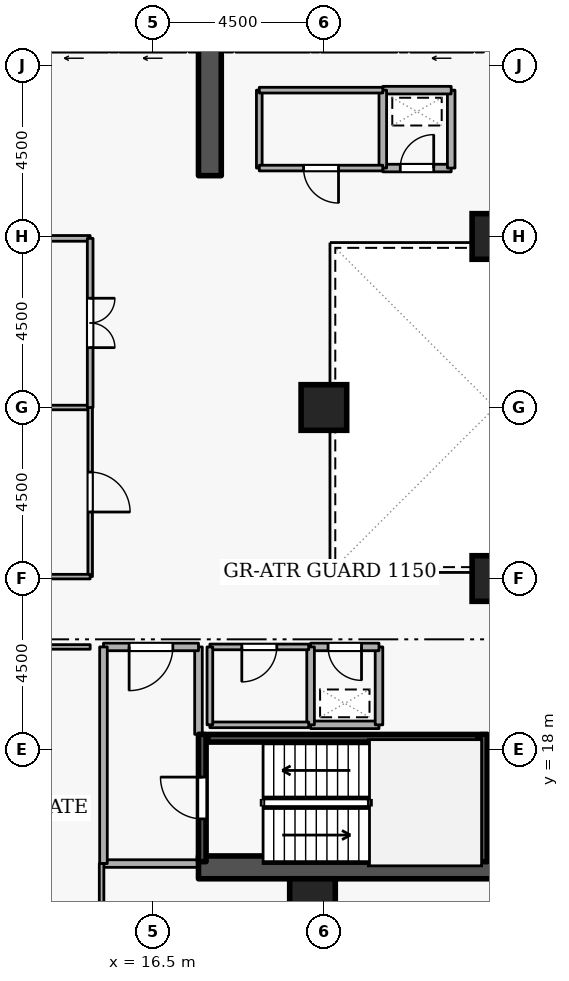
"""IFC4 building model, lengths in metres.
Left out: names, types, materials, properties, quantities, classifications, styles, units other than length and angle.
Written with IfcOpenShell. Run it as: python <this file> out.ifc"""

import sys

from ifc_helpers import new_model, si_unit, direction, frame, frame_2d, origin, origin_2d, place, context, subcontext, project, spatial, rectangle, extrude, element, fill, save


model = new_model("IFC4")
c1 = context("Model", 3, precision=1e-05, world=origin(), true_north=direction((0.0, 1.0)))
c2 = subcontext(c1, "Body", "Model", "MODEL_VIEW")
j1 = project(units=[si_unit("LENGTHUNIT", "METRE"), si_unit("PLANEANGLEUNIT", "RADIAN")], contexts=[c1])
p1 = place(None, origin())
s1 = spatial("IfcSite", under=j1, at=p1, CompositionType="ELEMENT")
p2 = place(p1, origin())
s2 = spatial("IfcBuilding", under=s1, at=p2, CompositionType="ELEMENT")
p3 = place(p2, frame((0.0, 0.0, 80.1)))
s3 = spatial("IfcBuildingStorey", under=s2, at=p3, CompositionType="ELEMENT", Elevation=80.1)
p4 = place(p3, frame((17.7, 14.9, 0.0), z_axis=(0.0, 0.0, 1.0), x_axis=(1.0, 0.0, 0.0)))
e1 = element("IfcWall", 1, at=p4, inside=s3, PredefinedType="SHEAR", context=c2, shape_type="SweptSolid", body=[
    extrude(rectangle(XDim=15.6, YDim=0.6, at=frame_2d((7.8, 0.0))), origin(), (0.0, 0.0, 1.0), 3.6),
])
p5 = place(p3, frame((18.0, 33.1, 0.0), z_axis=(0.0, 0.0, 1.0), x_axis=(0.0, 1.0, 0.0)))
e2 = element("IfcWall", 2, at=p5, inside=s3, PredefinedType="SHEAR", context=c2, shape_type="SweptSolid", body=[
    extrude(rectangle(XDim=5.7, YDim=0.6, at=frame_2d((2.85, 0.0))), origin(), (0.0, 0.0, 1.0), 3.6),
])
for number, where, z_axis, x_axis in (
    (3, (20.7, 14.0, 0.0), (0.0, 0.0, 1.0), (1.0, 0.0, 0.0)),
    (4, (25.5, 22.5, 0.0), (0.0, 0.0, 1.0), (1.0, 0.0, 0.0)),
    (5, (25.5, 31.5, 0.0), (0.0, 0.0, 1.0), (1.0, 0.0, 0.0)),
    (6, (21.0, 27.0, 0.0), (0.0, 0.0, 1.0), (1.0, 0.0, 0.0)),
):
    element("IfcColumn", number, at=place(p3, frame(where, z_axis=z_axis, x_axis=x_axis)), inside=s3, PredefinedType="COLUMN", context=c2, shape_type="SweptSolid", body=[
        extrude(rectangle(XDim=1.2, YDim=1.2, at=origin_2d()), origin(), (0.0, 0.0, 1.0), 3.6),
    ])
p6 = place(p3, frame((24.92, 36.45, 0.0), z_axis=(0.0, 0.0, 1.0), x_axis=(-1.0, 0.0, 0.0)))
e7 = element("IfcWall", 7, at=p6, inside=s3, PredefinedType="STANDARD", context=c2, shape_type="SweptSolid", body=[
    extrude(rectangle(XDim=1.64, YDim=0.2, at=frame_2d((0.82, 0.0))), origin(), (0.0, 0.0, 1.0), 3.34),
])
p7 = place(p6, frame((0.31, 0.0, 0.0)))
e8 = element("IfcOpeningElement", 8, at=p7, cuts=e7, PredefinedType="OPENING", context=c2, shape_type="SweptSolid", body=[
    extrude(rectangle(XDim=1.02, YDim=2.06, at=frame_2d((0.51, 1.03))), frame((0.0, 0.11, 0.0), z_axis=(0.0, -1.0, 0.0), x_axis=(1.0, 0.0, 0.0)), (0.0, 0.0, 1.0), 0.22),
])
p8 = place(p3, frame((22.92, 36.45, 0.0), z_axis=(0.0, 0.0, 1.0), x_axis=(-1.0, 0.0, 0.0)))
e9 = element("IfcWall", 9, at=p8, inside=s3, PredefinedType="STANDARD", context=c2, shape_type="SweptSolid", body=[
    extrude(rectangle(XDim=1.99, YDim=0.2, at=frame_2d((0.995, 0.0))), origin(), (0.0, 0.0, 1.0), 3.34),
])
p9 = place(p3, frame((20.62, 36.45, 0.0), z_axis=(0.0, 0.0, 1.0), x_axis=(-1.0, 0.0, 0.0)))
e10 = element("IfcWall", 10, at=p9, inside=s3, PredefinedType="STANDARD", context=c2, shape_type="SweptSolid", body=[
    extrude(rectangle(XDim=1.94, YDim=0.2, at=frame_2d((0.97, 0.0))), origin(), (0.0, 0.0, 1.0), 3.34),
])
p10 = place(p3, frame((17.37, 36.45, 0.0), z_axis=(0.0, 0.0, 1.0), x_axis=(-1.0, 0.0, 0.0)))
e11 = element("IfcWall", 11, at=p10, inside=s3, PredefinedType="STANDARD", context=c2, shape_type="SweptSolid", body=[
    extrude(rectangle(XDim=1.74, YDim=0.2, at=frame_2d((0.87, 0.0))), origin(), (0.0, 0.0, 1.0), 3.34),
])
p11 = place(p10, frame((0.36, 0.0, 0.0)))
e12 = element("IfcOpeningElement", 12, at=p11, cuts=e11, PredefinedType="OPENING", context=c2, shape_type="SweptSolid", body=[
    extrude(rectangle(XDim=1.02, YDim=2.06, at=frame_2d((0.51, 1.03))), frame((0.0, 0.11, 0.0), z_axis=(0.0, -1.0, 0.0), x_axis=(1.0, 0.0, 0.0)), (0.0, 0.0, 1.0), 0.22),
])
p12 = place(p3, frame((15.32, 36.45, 0.0), z_axis=(0.0, 0.0, 1.0), x_axis=(-1.0, 0.0, 0.0)))
e13 = element("IfcWall", 13, at=p12, inside=s3, PredefinedType="STANDARD", context=c2, shape_type="SweptSolid", body=[
    extrude(rectangle(XDim=1.79, YDim=0.2, at=frame_2d((0.895, 0.0))), origin(), (0.0, 0.0, 1.0), 3.34),
])
p13 = place(p12, frame((0.385, 0.0, 0.0)))
e14 = element("IfcOpeningElement", 14, at=p13, cuts=e13, PredefinedType="OPENING", context=c2, shape_type="SweptSolid", body=[
    extrude(rectangle(XDim=1.02, YDim=2.06, at=frame_2d((0.51, 1.03))), frame((0.0, 0.11, 0.0), z_axis=(0.0, -1.0, 0.0), x_axis=(1.0, 0.0, 0.0)), (0.0, 0.0, 1.0), 0.22),
])
p14 = place(p3, frame((17.8, 15.05, 0.0), z_axis=(0.0, 0.0, 1.0), x_axis=(0.0, 1.0, 0.0)))
e15 = element("IfcWall", 15, at=p14, inside=s3, PredefinedType="SHEAR", context=c2, shape_type="SweptSolid", body=[
    extrude(rectangle(XDim=3.35, YDim=0.2, at=frame_2d((1.675, 0.0))), origin(), (0.0, 0.0, 1.0), 3.6),
])
p15 = place(p14, frame((1.125, 0.0, 0.0)))
e16 = element("IfcOpeningElement", 16, at=p15, cuts=e15, PredefinedType="OPENING", context=c2, shape_type="SweptSolid", body=[
    extrude(rectangle(XDim=1.1, YDim=2.1, at=frame_2d((0.55, 1.05))), frame((0.0, 0.11, 0.0), z_axis=(0.0, -1.0, 0.0), x_axis=(1.0, 0.0, 0.0)), (0.0, 0.0, 1.0), 0.22),
])
p16 = place(p3, frame((25.2, 18.4, 0.0), z_axis=(0.0, 0.0, 1.0), x_axis=(0.0, -1.0, 0.0)))
e17 = element("IfcWall", 17, at=p16, inside=s3, PredefinedType="SHEAR", context=c2, shape_type="SweptSolid", body=[
    extrude(rectangle(XDim=3.35, YDim=0.2, at=frame_2d((1.675, 0.0))), origin(), (0.0, 0.0, 1.0), 3.6),
])
p17 = place(p3, frame((25.05, 18.297, 0.0), z_axis=(0.0, 0.0, 1.0), x_axis=(-1.0, 0.0, 0.0)))
e18 = element("IfcWall", 18, at=p17, inside=s3, PredefinedType="SHEAR", context=c2, shape_type="SweptSolid", body=[
    extrude(rectangle(XDim=7.1, YDim=0.2, at=frame_2d((3.55, 0.0))), origin(), (0.0, 0.0, 1.0), 3.6),
])
p18 = place(p3, frame((15.2, 15.0, 0.0), z_axis=(0.0, 0.0, 1.0), x_axis=(1.0, 0.0, 0.0)))
e19 = element("IfcWall", 19, at=p18, inside=s3, PredefinedType="STANDARD", context=c2, shape_type="SweptSolid", body=[
    extrude(rectangle(XDim=2.5, YDim=0.2, at=frame_2d((1.25, 0.0))), origin(), (0.0, 0.0, 1.0), 3.34),
])
p19 = place(p3, frame((17.7, 18.4, 0.0), z_axis=(0.0, 0.0, 1.0), x_axis=(0.0, 1.0, 0.0)))
e20 = element("IfcWall", 20, at=p19, inside=s3, PredefinedType="STANDARD", context=c2, shape_type="SweptSolid", body=[
    extrude(rectangle(XDim=2.3, YDim=0.2, at=frame_2d((1.15, 0.0))), origin(), (0.0, 0.0, 1.0), 2.545),
])
p20 = place(p3, frame((17.7, 20.7, 0.0), z_axis=(0.0, 0.0, 1.0), x_axis=(-1.0, 0.0, 0.0)))
e21 = element("IfcWall", 21, at=p20, inside=s3, PredefinedType="STANDARD", context=c2, shape_type="SweptSolid", body=[
    extrude(rectangle(XDim=2.5, YDim=0.2, at=frame_2d((1.25, 0.0))), origin(), (0.0, 0.0, 1.0), 3.34),
])
p21 = place(p20, frame((0.675, 0.0, 0.0)))
e22 = element("IfcOpeningElement", 22, at=p21, cuts=e21, PredefinedType="OPENING", context=c2, shape_type="SweptSolid", body=[
    extrude(rectangle(XDim=1.15, YDim=2.1, at=frame_2d((0.575, 1.05))), frame((0.0, 0.11, 0.0), z_axis=(0.0, -1.0, 0.0), x_axis=(1.0, 0.0, 0.0)), (0.0, 0.0, 1.0), 0.22),
])
p22 = place(p3, frame((15.2, 20.7, 0.0), z_axis=(0.0, 0.0, 1.0), x_axis=(0.0, -1.0, 0.0)))
e23 = element("IfcWall", 23, at=p22, inside=s3, PredefinedType="STANDARD", context=c2, shape_type="SweptSolid", body=[
    extrude(rectangle(XDim=5.7, YDim=0.2, at=frame_2d((2.85, 0.0))), origin(), (0.0, 0.0, 1.0), 3.34),
])
p23 = place(p3, frame((20.65, 18.65, 0.0), z_axis=(0.0, 0.0, 1.0), x_axis=(1.0, 0.0, 0.0)))
e24 = element("IfcWall", 24, at=p23, inside=s3, PredefinedType="STANDARD", context=c2, shape_type="SweptSolid", body=[
    extrude(rectangle(XDim=1.8, YDim=0.2, at=frame_2d((0.9, 0.0))), origin(), (0.0, 0.0, 1.0), 3.34),
])
p24 = place(p3, frame((22.45, 18.65, 0.0), z_axis=(0.0, 0.0, 1.0), x_axis=(0.0, 1.0, 0.0)))
e25 = element("IfcWall", 25, at=p24, inside=s3, PredefinedType="STANDARD", context=c2, shape_type="SweptSolid", body=[
    extrude(rectangle(XDim=2.05, YDim=0.2, at=frame_2d((1.025, 0.0))), origin(), (0.0, 0.0, 1.0), 3.34),
])
p25 = place(p3, frame((22.45, 20.7, 0.0), z_axis=(0.0, 0.0, 1.0), x_axis=(-1.0, 0.0, 0.0)))
e26 = element("IfcWall", 26, at=p25, inside=s3, PredefinedType="STANDARD", context=c2, shape_type="SweptSolid", body=[
    extrude(rectangle(XDim=1.8, YDim=0.2, at=frame_2d((0.9, 0.0))), origin(), (0.0, 0.0, 1.0), 3.34),
])
p26 = place(p25, frame((0.46, 0.0, 0.0)))
e27 = element("IfcOpeningElement", 27, at=p26, cuts=e26, PredefinedType="OPENING", context=c2, shape_type="SweptSolid", body=[
    extrude(rectangle(XDim=0.88, YDim=2.04, at=frame_2d((0.44, 1.02))), frame((0.0, 0.11, 0.0), z_axis=(0.0, -1.0, 0.0), x_axis=(1.0, 0.0, 0.0)), (0.0, 0.0, 1.0), 0.22),
])
p27 = place(p3, frame((20.65, 20.7, 0.0), z_axis=(0.0, 0.0, 1.0), x_axis=(0.0, -1.0, 0.0)))
e28 = element("IfcWall", 28, at=p27, inside=s3, PredefinedType="STANDARD", context=c2, shape_type="SweptSolid", body=[
    extrude(rectangle(XDim=2.05, YDim=0.2, at=frame_2d((1.025, 0.0))), origin(), (0.0, 0.0, 1.0), 3.34),
])
p28 = place(p3, frame((22.55, 33.3, 0.0), z_axis=(0.0, 0.0, 1.0), x_axis=(1.0, 0.0, 0.0)))
e29 = element("IfcWall", 29, at=p28, inside=s3, PredefinedType="STANDARD", context=c2, shape_type="SweptSolid", body=[
    extrude(rectangle(XDim=1.8, YDim=0.2, at=frame_2d((0.9, 0.0))), origin(), (0.0, 0.0, 1.0), 3.34),
])
p29 = place(p28, frame((0.46, 0.0, 0.0)))
e30 = element("IfcOpeningElement", 30, at=p29, cuts=e29, PredefinedType="OPENING", context=c2, shape_type="SweptSolid", body=[
    extrude(rectangle(XDim=0.88, YDim=2.04, at=frame_2d((0.44, 1.02))), frame((0.0, 0.11, 0.0), z_axis=(0.0, -1.0, 0.0), x_axis=(1.0, 0.0, 0.0)), (0.0, 0.0, 1.0), 0.22),
])
p30 = place(p3, frame((24.35, 33.3, 0.0), z_axis=(0.0, 0.0, 1.0), x_axis=(0.0, 1.0, 0.0)))
e31 = element("IfcWall", 31, at=p30, inside=s3, PredefinedType="STANDARD", context=c2, shape_type="SweptSolid", body=[
    extrude(rectangle(XDim=2.05, YDim=0.2, at=frame_2d((1.025, 0.0))), origin(), (0.0, 0.0, 1.0), 3.34),
])
p31 = place(p3, frame((24.35, 35.35, 0.0), z_axis=(0.0, 0.0, 1.0), x_axis=(-1.0, 0.0, 0.0)))
e32 = element("IfcWall", 32, at=p31, inside=s3, PredefinedType="STANDARD", context=c2, shape_type="SweptSolid", body=[
    extrude(rectangle(XDim=1.8, YDim=0.2, at=frame_2d((0.9, 0.0))), origin(), (0.0, 0.0, 1.0), 3.34),
])
p32 = place(p3, frame((22.55, 35.35, 0.0), z_axis=(0.0, 0.0, 1.0), x_axis=(0.0, -1.0, 0.0)))
e33 = element("IfcWall", 33, at=p32, inside=s3, PredefinedType="STANDARD", context=c2, shape_type="SweptSolid", body=[
    extrude(rectangle(XDim=2.05, YDim=0.2, at=frame_2d((1.025, 0.0))), origin(), (0.0, 0.0, 1.0), 3.34),
])
p33 = place(p3, frame((18.0, 18.65, 0.0), z_axis=(0.0, 0.0, 1.0), x_axis=(1.0, 0.0, 0.0)))
e34 = element("IfcWall", 34, at=p33, inside=s3, PredefinedType="PARTITIONING", context=c2, shape_type="SweptSolid", body=[
    extrude(rectangle(XDim=2.6, YDim=0.15, at=frame_2d((1.3, 0.0))), origin(), (0.0, 0.0, 1.0), 3.34),
])
p34 = place(p3, frame((20.6, 20.7, 0.0), z_axis=(0.0, 0.0, 1.0), x_axis=(-1.0, 0.0, 0.0)))
e35 = element("IfcWall", 35, at=p34, inside=s3, PredefinedType="PARTITIONING", context=c2, shape_type="SweptSolid", body=[
    extrude(rectangle(XDim=2.6, YDim=0.15, at=frame_2d((1.3, 0.0))), origin(), (0.0, 0.0, 1.0), 3.34),
])
p35 = place(p34, frame((0.84, 0.0, 0.0)))
e36 = element("IfcOpeningElement", 36, at=p35, cuts=e35, PredefinedType="OPENING", context=c2, shape_type="SweptSolid", body=[
    extrude(rectangle(XDim=0.92, YDim=2.08, at=frame_2d((0.46, 1.04))), frame((0.0, 0.085, 0.0), z_axis=(0.0, -1.0, 0.0), x_axis=(1.0, 0.0, 0.0)), (0.0, 0.0, 1.0), 0.17),
])
p36 = place(p3, frame((18.0, 20.7, 0.0), z_axis=(0.0, 0.0, 1.0), x_axis=(0.0, -1.0, 0.0)))
e37 = element("IfcWall", 37, at=p36, inside=s3, PredefinedType="PARTITIONING", context=c2, shape_type="SweptSolid", body=[
    extrude(rectangle(XDim=2.05, YDim=0.15, at=frame_2d((1.025, 0.0))), origin(), (0.0, 0.0, 1.0), 2.545),
])
p37 = place(p3, frame((19.3, 33.3, 0.0), z_axis=(0.0, 0.0, 1.0), x_axis=(0.0, 1.0, 0.0)))
e38 = element("IfcWall", 38, at=p37, inside=s3, PredefinedType="PARTITIONING", context=c2, shape_type="SweptSolid", body=[
    extrude(rectangle(XDim=2.05, YDim=0.15, at=frame_2d((1.025, 0.0))), origin(), (0.0, 0.0, 1.0), 3.34),
])
p38 = place(p3, frame((19.3, 35.35, 0.0), z_axis=(0.0, 0.0, 1.0), x_axis=(1.0, 0.0, 0.0)))
e39 = element("IfcWall", 39, at=p38, inside=s3, PredefinedType="PARTITIONING", context=c2, shape_type="SweptSolid", body=[
    extrude(rectangle(XDim=3.25, YDim=0.15, at=frame_2d((1.625, 0.0))), origin(), (0.0, 0.0, 1.0), 3.34),
])
p39 = place(p3, frame((22.55, 33.3, 0.0), z_axis=(0.0, 0.0, 1.0), x_axis=(-1.0, 0.0, 0.0)))
e40 = element("IfcWall", 40, at=p39, inside=s3, PredefinedType="PARTITIONING", context=c2, shape_type="SweptSolid", body=[
    extrude(rectangle(XDim=3.25, YDim=0.15, at=frame_2d((1.625, 0.0))), origin(), (0.0, 0.0, 1.0), 3.34),
])
p40 = place(p39, frame((1.165, 0.0, 0.0)))
e41 = element("IfcOpeningElement", 41, at=p40, cuts=e40, PredefinedType="OPENING", context=c2, shape_type="SweptSolid", body=[
    extrude(rectangle(XDim=0.92, YDim=2.08, at=frame_2d((0.46, 1.04))), frame((0.0, 0.085, 0.0), z_axis=(0.0, -1.0, 0.0), x_axis=(1.0, 0.0, 0.0)), (0.0, 0.0, 1.0), 0.17),
])
p41 = place(p3, frame((7.58, 27.0, 0.0), z_axis=(0.0, 0.0, 1.0), x_axis=(1.0, 0.0, 0.0)))
e42 = element("IfcWall", 42, at=p41, inside=s3, PredefinedType="PARTITIONING", context=c2, shape_type="SweptSolid", body=[
    extrude(rectangle(XDim=7.27, YDim=0.12, at=frame_2d((3.635, 0.0))), origin(), (0.0, 0.0, 1.0), 2.882),
])
p42 = place(p3, frame((14.85, 27.0, 0.0), z_axis=(0.0, 0.0, 1.0), x_axis=(0.0, -1.0, 0.0)))
e43 = element("IfcWall", 43, at=p42, inside=s3, PredefinedType="PARTITIONING", context=c2, shape_type="SweptSolid", body=[
    extrude(rectangle(XDim=4.45, YDim=0.12, at=frame_2d((2.225, 0.0))), origin(), (0.0, 0.0, 1.0), 3.34),
])
p43 = place(p42, frame((1.7, 0.0, 0.0)))
e44 = element("IfcOpeningElement", 44, at=p43, cuts=e43, PredefinedType="OPENING", context=c2, shape_type="SweptSolid", body=[
    extrude(rectangle(XDim=1.05, YDim=2.1, at=frame_2d((0.525, 1.05))), frame((0.0, 0.07, 0.0), z_axis=(0.0, -1.0, 0.0), x_axis=(1.0, 0.0, 0.0)), (0.0, 0.0, 1.0), 0.14),
])
for number, where, z_axis, x_axis in (
    (45, (14.85, 22.55, 0.0), (0.0, 0.0, 1.0), (-1.0, 0.0, 0.0)),
    (46, (13.25, 20.7, 0.0), (0.0, 0.0, 1.0), (1.0, 0.0, 0.0)),
):
    element("IfcWall", number, at=place(p3, frame(where, z_axis=z_axis, x_axis=x_axis)), inside=s3, PredefinedType="PARTITIONING", context=c2, shape_type="SweptSolid", body=[
        extrude(rectangle(XDim=1.6, YDim=0.12, at=frame_2d((0.8, 0.0))), origin(), (0.0, 0.0, 1.0), 3.34),
    ])
p44 = place(p3, frame((15.15, 15.0, 0.0), z_axis=(0.0, 0.0, 1.0), x_axis=(0.0, -1.0, 0.0)))
e47 = element("IfcWall", 47, at=p44, inside=s3, PredefinedType="PARTITIONING", context=c2, shape_type="SweptSolid", body=[
    extrude(rectangle(XDim=5.92, YDim=0.12, at=frame_2d((2.96, 0.0))), origin(), (0.0, 0.0, 1.0), 3.34),
])
p45 = place(p3, frame((13.25, 31.45, 0.0), z_axis=(0.0, 0.0, 1.0), x_axis=(1.0, 0.0, 0.0)))
e48 = element("IfcWall", 48, at=p45, inside=s3, PredefinedType="PARTITIONING", context=c2, shape_type="SweptSolid", body=[
    extrude(rectangle(XDim=1.6, YDim=0.15, at=frame_2d((0.8, 0.0))), origin(), (0.0, 0.0, 1.0), 3.34),
])
p46 = place(p3, frame((14.85, 31.45, 0.0), z_axis=(0.0, 0.0, 1.0), x_axis=(0.0, -1.0, 0.0)))
e49 = element("IfcWall", 49, at=p46, inside=s3, PredefinedType="PARTITIONING", context=c2, shape_type="SweptSolid", body=[
    extrude(rectangle(XDim=4.45, YDim=0.15, at=frame_2d((2.225, 0.0))), origin(), (0.0, 0.0, 1.0), 3.34),
])
p47 = place(p46, frame((1.575, 0.0, 0.0)))
e50 = element("IfcOpeningElement", 50, at=p47, cuts=e49, PredefinedType="OPENING", context=c2, shape_type="SweptSolid", body=[
    extrude(rectangle(XDim=1.3, YDim=2.12, at=frame_2d((0.65, 1.06))), frame((0.0, 0.085, 0.0), z_axis=(0.0, -1.0, 0.0), x_axis=(1.0, 0.0, 0.0)), (0.0, 0.0, 1.0), 0.17),
])
p48 = place(p15, origin())
e51 = element("IfcDoor", 51, at=p48, inside=s3, OperationType="SINGLE_SWING_RIGHT", PredefinedType="DOOR", context=c2, shape_type="SweptSolid", body=[
    extrude(rectangle(XDim=1.1, YDim=2.1, at=frame_2d((0.55, 1.05))), frame((0.0, 0.025, 0.0), z_axis=(0.0, -1.0, 0.0), x_axis=(1.0, 0.0, 0.0)), (0.0, 0.0, 1.0), 0.05),
])
fill(e16, e51)
p49 = place(p21, origin())
e52 = element("IfcDoor", 52, at=p49, inside=s3, OperationType="SINGLE_SWING_RIGHT", PredefinedType="DOOR", context=c2, shape_type="SweptSolid", body=[
    extrude(rectangle(XDim=1.15, YDim=2.1, at=frame_2d((0.575, 1.05))), frame((0.0, 0.025, 0.0), z_axis=(0.0, -1.0, 0.0), x_axis=(1.0, 0.0, 0.0)), (0.0, 0.0, 1.0), 0.05),
])
fill(e22, e52)
p50 = place(p26, origin())
e53 = element("IfcDoor", 53, at=p50, inside=s3, OperationType="SINGLE_SWING_LEFT", PredefinedType="DOOR", context=c2, shape_type="SweptSolid", body=[
    extrude(rectangle(XDim=0.88, YDim=2.04, at=frame_2d((0.44, 1.02))), frame((0.0, 0.025, 0.0), z_axis=(0.0, -1.0, 0.0), x_axis=(1.0, 0.0, 0.0)), (0.0, 0.0, 1.0), 0.05),
])
fill(e27, e53)
p51 = place(p29, origin())
e54 = element("IfcDoor", 54, at=p51, inside=s3, OperationType="SINGLE_SWING_RIGHT", PredefinedType="DOOR", context=c2, shape_type="SweptSolid", body=[
    extrude(rectangle(XDim=0.88, YDim=2.04, at=frame_2d((0.44, 1.02))), frame((0.0, 0.025, 0.0), z_axis=(0.0, -1.0, 0.0), x_axis=(1.0, 0.0, 0.0)), (0.0, 0.0, 1.0), 0.05),
])
fill(e30, e54)
p52 = place(p35, origin())
e55 = element("IfcDoor", 55, at=p52, inside=s3, OperationType="SINGLE_SWING_RIGHT", PredefinedType="DOOR", context=c2, shape_type="SweptSolid", body=[
    extrude(rectangle(XDim=0.92, YDim=2.08, at=frame_2d((0.46, 1.04))), frame((0.0, 0.025, 0.0), z_axis=(0.0, -1.0, 0.0), x_axis=(1.0, 0.0, 0.0)), (0.0, 0.0, 1.0), 0.05),
])
fill(e36, e55)
p53 = place(p40, origin())
e56 = element("IfcDoor", 56, at=p53, inside=s3, OperationType="SINGLE_SWING_LEFT", PredefinedType="DOOR", context=c2, shape_type="SweptSolid", body=[
    extrude(rectangle(XDim=0.92, YDim=2.08, at=frame_2d((0.46, 1.04))), frame((0.0, 0.025, 0.0), z_axis=(0.0, -1.0, 0.0), x_axis=(1.0, 0.0, 0.0)), (0.0, 0.0, 1.0), 0.05),
])
fill(e41, e56)
p54 = place(p43, origin())
e57 = element("IfcDoor", 57, at=p54, inside=s3, OperationType="SINGLE_SWING_RIGHT", PredefinedType="DOOR", context=c2, shape_type="SweptSolid", body=[
    extrude(rectangle(XDim=1.05, YDim=2.1, at=frame_2d((0.525, 1.05))), frame((0.0, 0.025, 0.0), z_axis=(0.0, -1.0, 0.0), x_axis=(1.0, 0.0, 0.0)), (0.0, 0.0, 1.0), 0.05),
])
fill(e44, e57)
p55 = place(p47, origin())
e58 = element("IfcDoor", 58, at=p55, inside=s3, OperationType="DOUBLE_DOOR_SINGLE_SWING", PredefinedType="DOOR", context=c2, shape_type="SweptSolid", body=[
    extrude(rectangle(XDim=1.3, YDim=2.12, at=frame_2d((0.65, 1.06))), frame((0.0, 0.025, 0.0), z_axis=(0.0, -1.0, 0.0), x_axis=(1.0, 0.0, 0.0)), (0.0, 0.0, 1.0), 0.05),
])
fill(e50, e58)
save(model, sys.argv[1])
